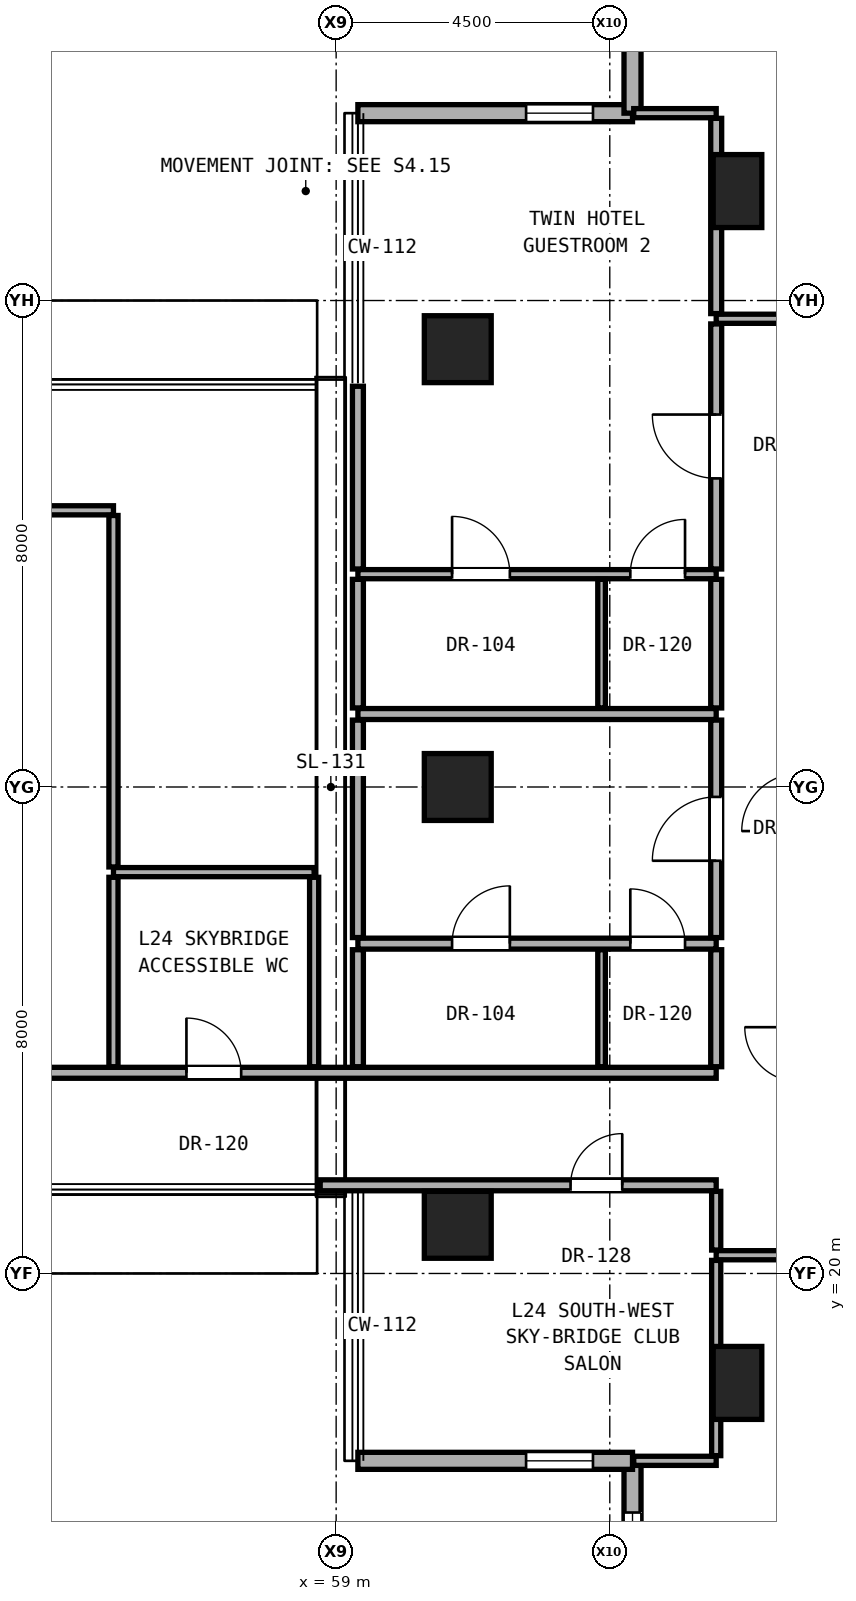
"""IFC4 building model, lengths in metres.
Left out: names, types, materials, properties, quantities, classifications, styles, units other than length and angle.
Written with IfcOpenShell. Run it as: python <this file> out.ifc"""

import sys

from ifc_helpers import new_model, si_unit, direction, frame, frame_2d, origin, origin_2d, place, context, subcontext, project, spatial, rectangle, hollow_rectangle, extrude, element, fill, save


model = new_model("IFC4")
c1 = context("Model", 3, precision=1e-05, world=origin(), true_north=direction((0.0, 1.0)))
c2 = subcontext(c1, "Body", "Model", "MODEL_VIEW")
j1 = project(units=[si_unit("LENGTHUNIT", "METRE"), si_unit("PLANEANGLEUNIT", "RADIAN")], contexts=[c1])
p1 = place(None, origin())
s1 = spatial("IfcSite", under=j1, at=p1, CompositionType="ELEMENT")
p2 = place(p1, origin())
s2 = spatial("IfcBuilding", under=s1, at=p2, CompositionType="ELEMENT")
p3 = place(p2, frame((0.0, 0.0, 88.4)))
s3 = spatial("IfcBuildingStorey", under=s2, at=p3, CompositionType="ELEMENT", Elevation=88.4)
for number, where, z_axis, x_axis in (
    (1, (61.0, 20.8, 0.0), (0.0, 0.0, 1.0), (1.0, 0.0, 0.0)),
    (2, (61.0, 28.0, 0.0), (0.0, 0.0, 1.0), (1.0, 0.0, 0.0)),
    (3, (61.0, 35.2, 0.0), (0.0, 0.0, 1.0), (1.0, 0.0, 0.0)),
):
    element("IfcColumn", number, at=place(p3, frame(where, z_axis=z_axis, x_axis=x_axis)), inside=s3, PredefinedType="COLUMN", context=c2, shape_type="SweptSolid", body=[
        extrude(hollow_rectangle(XDim=1.1, YDim=1.1, WallThickness=0.06, at=origin_2d()), origin(), (0.0, 0.0, 1.0), 3.3),
    ])
for number, where, z_axis, x_axis in (
    (4, (65.6, 18.2, 0.0), (0.0, 0.0, 1.0), (1.0, 0.0, 0.0)),
    (5, (65.6, 37.8, 0.0), (0.0, 0.0, 1.0), (1.0, 0.0, 0.0)),
):
    element("IfcColumn", number, at=place(p3, frame(where, z_axis=z_axis, x_axis=x_axis)), inside=s3, PredefinedType="PILASTER", context=c2, shape_type="SweptSolid", body=[
        extrude(rectangle(XDim=0.8, YDim=1.2, at=origin_2d()), origin(), (0.0, 0.0, 1.0), 3.3),
    ])
p4 = place(p3, frame((63.874, 16.919, 0.0), z_axis=(0.0, 0.0, 1.0), x_axis=(0.0, -1.0, 0.0)))
e6 = element("IfcWall", 6, at=p4, inside=s3, PredefinedType="SOLIDWALL", context=c2, shape_type="SweptSolid", body=[
    extrude(rectangle(XDim=4.516, YDim=0.28, at=frame_2d((2.258, 0.0))), origin(), (0.0, 0.0, 1.0), 3.06),
])
p5 = place(p4, frame((0.85, 0.0, 0.81)))
e7 = element("IfcOpeningElement", 7, at=p5, cuts=e6, PredefinedType="OPENING", context=c2, shape_type="SweptSolid", body=[
    extrude(rectangle(XDim=1.8, YDim=2.1, at=frame_2d((0.9, 1.05))), frame((0.0, 0.15, 0.0), z_axis=(0.0, -1.0, 0.0), x_axis=(1.0, 0.0, 0.0)), (0.0, 0.0, 1.0), 0.3),
])
p6 = place(p3, frame((59.357, 16.919, 0.0), z_axis=(0.0, 0.0, 1.0), x_axis=(1.0, 0.0, 0.0)))
e8 = element("IfcWall", 8, at=p6, inside=s3, PredefinedType="SOLIDWALL", context=c2, shape_type="SweptSolid", body=[
    extrude(rectangle(XDim=4.516, YDim=0.28, at=frame_2d((2.258, 0.0))), origin(), (0.0, 0.0, 1.0), 3.06),
])
p7 = place(p6, frame((2.766, 0.0, 0.85)))
e9 = element("IfcOpeningElement", 9, at=p7, cuts=e8, PredefinedType="OPENING", context=c2, shape_type="SweptSolid", body=[
    extrude(rectangle(XDim=1.1, YDim=2.0, at=frame_2d((0.55, 1.0))), frame((0.0, 0.15, 0.0), z_axis=(0.0, -1.0, 0.0), x_axis=(1.0, 0.0, 0.0)), (0.0, 0.0, 1.0), 0.3),
])
p8 = place(p3, frame((63.874, 39.081, 0.0), z_axis=(0.0, 0.0, 1.0), x_axis=(-1.0, 0.0, 0.0)))
e10 = element("IfcWall", 10, at=p8, inside=s3, PredefinedType="SOLIDWALL", context=c2, shape_type="SweptSolid", body=[
    extrude(rectangle(XDim=4.516, YDim=0.28, at=frame_2d((2.258, 0.0))), origin(), (0.0, 0.0, 1.0), 3.06),
])
p9 = place(p8, frame((0.65, 0.0, 0.85)))
e11 = element("IfcOpeningElement", 11, at=p9, cuts=e10, PredefinedType="OPENING", context=c2, shape_type="SweptSolid", body=[
    extrude(rectangle(XDim=1.1, YDim=2.0, at=frame_2d((0.55, 1.0))), frame((0.0, 0.15, 0.0), z_axis=(0.0, -1.0, 0.0), x_axis=(1.0, 0.0, 0.0)), (0.0, 0.0, 1.0), 0.3),
])
p10 = place(p3, frame((63.874, 43.597, 0.0), z_axis=(0.0, 0.0, 1.0), x_axis=(0.0, -1.0, 0.0)))
e12 = element("IfcWall", 12, at=p10, inside=s3, PredefinedType="SOLIDWALL", context=c2, shape_type="SweptSolid", body=[
    extrude(rectangle(XDim=4.516, YDim=0.28, at=frame_2d((2.258, 0.0))), origin(), (0.0, 0.0, 1.0), 3.06),
])
p11 = place(p3, frame((63.894, 16.919, 0.0), z_axis=(0.0, 0.0, 1.0), x_axis=(1.0, 0.0, 0.0)))
e13 = element("IfcWall", 13, at=p11, inside=s3, PredefinedType="PARTITIONING", context=c2, shape_type="SweptSolid", body=[
    extrude(rectangle(XDim=1.356, YDim=0.15, at=frame_2d((0.678, 0.0))), origin(), (0.0, 0.0, 1.0), 3.08),
])
p12 = place(p3, frame((65.25, 20.3, 0.0), z_axis=(0.0, 0.0, 1.0), x_axis=(1.0, 0.0, 0.0)))
e14 = element("IfcWall", 14, at=p12, inside=s3, PredefinedType="PARTITIONING", context=c2, shape_type="SweptSolid", body=[
    extrude(rectangle(XDim=1.37, YDim=0.15, at=frame_2d((0.685, 0.0))), origin(), (0.0, 0.0, 1.0), 3.08),
])
p13 = place(p3, frame((58.738, 21.45, 0.0), z_axis=(0.0, 0.0, 1.0), x_axis=(1.0, 0.0, 0.0)))
e15 = element("IfcWall", 15, at=p13, inside=s3, PredefinedType="PARTITIONING", context=c2, shape_type="SweptSolid", body=[
    extrude(rectangle(XDim=6.512, YDim=0.18, at=frame_2d((3.256, 0.0))), origin(), (0.0, 0.0, 1.0), 2.085),
])
p14 = place(p13, frame((4.117, 0.0, 0.0)))
e16 = element("IfcOpeningElement", 16, at=p14, cuts=e15, PredefinedType="OPENING", context=c2, shape_type="SweptSolid", body=[
    extrude(rectangle(XDim=0.85, YDim=2.01, at=frame_2d((0.425, 1.005))), frame((0.0, 0.1, 0.0), z_axis=(0.0, -1.0, 0.0), x_axis=(1.0, 0.0, 0.0)), (0.0, 0.0, 1.0), 0.2),
])
p15 = place(p3, frame((32.14, 23.3, 0.0), z_axis=(0.0, 0.0, 1.0), x_axis=(1.0, 0.0, 0.0)))
e17 = element("IfcWall", 17, at=p15, inside=s3, PredefinedType="PARTITIONING", context=c2, shape_type="SweptSolid", body=[
    extrude(rectangle(XDim=33.11, YDim=0.18, at=frame_2d((16.555, 0.0))), origin(), (0.0, 0.0, 1.0), 2.145),
])
p16 = place(p15, frame((12.335, 0.0, 0.0)))
e18 = element("IfcOpeningElement", 18, at=p16, cuts=e17, PredefinedType="OPENING", context=c2, shape_type="SweptSolid", body=[
    extrude(rectangle(XDim=0.85, YDim=2.01, at=frame_2d((0.425, 1.005))), frame((0.0, 0.1, 0.0), z_axis=(0.0, -1.0, 0.0), x_axis=(1.0, 0.0, 0.0)), (0.0, 0.0, 1.0), 0.2),
])
p17 = place(p15, frame((19.504, 0.0, 0.0)))
e19 = element("IfcOpeningElement", 19, at=p17, cuts=e17, PredefinedType="OPENING", context=c2, shape_type="SweptSolid", body=[
    extrude(rectangle(XDim=0.85, YDim=2.01, at=frame_2d((0.425, 1.005))), frame((0.0, 0.1, 0.0), z_axis=(0.0, -1.0, 0.0), x_axis=(1.0, 0.0, 0.0)), (0.0, 0.0, 1.0), 0.2),
])
p18 = place(p15, frame((24.398, 0.0, 0.0)))
e20 = element("IfcOpeningElement", 20, at=p18, cuts=e17, PredefinedType="OPENING", context=c2, shape_type="SweptSolid", body=[
    extrude(rectangle(XDim=0.9, YDim=2.1, at=frame_2d((0.45, 1.05))), frame((0.0, 0.1, 0.0), z_axis=(0.0, -1.0, 0.0), x_axis=(1.0, 0.0, 0.0)), (0.0, 0.0, 1.0), 0.2),
])
p19 = place(p3, frame((59.358, 25.424, 0.0), z_axis=(0.0, 0.0, 1.0), x_axis=(1.0, 0.0, 0.0)))
e21 = element("IfcWall", 21, at=p19, inside=s3, PredefinedType="PARTITIONING", context=c2, shape_type="SweptSolid", body=[
    extrude(rectangle(XDim=5.892, YDim=0.18, at=frame_2d((2.946, 0.0))), origin(), (0.0, 0.0, 1.0), 2.216),
])
p20 = place(p19, frame((1.549, 0.0, 0.0)))
e22 = element("IfcOpeningElement", 22, at=p20, cuts=e21, PredefinedType="OPENING", context=c2, shape_type="SweptSolid", body=[
    extrude(rectangle(XDim=0.95, YDim=2.15, at=frame_2d((0.475, 1.075))), frame((0.0, 0.1, 0.0), z_axis=(0.0, -1.0, 0.0), x_axis=(1.0, 0.0, 0.0)), (0.0, 0.0, 1.0), 0.2),
])
p21 = place(p19, frame((4.479, 0.0, 0.0)))
e23 = element("IfcOpeningElement", 23, at=p21, cuts=e21, PredefinedType="OPENING", context=c2, shape_type="SweptSolid", body=[
    extrude(rectangle(XDim=0.9, YDim=2.1, at=frame_2d((0.45, 1.05))), frame((0.0, 0.1, 0.0), z_axis=(0.0, -1.0, 0.0), x_axis=(1.0, 0.0, 0.0)), (0.0, 0.0, 1.0), 0.2),
])
p22 = place(p3, frame((55.338, 26.6, 0.0), z_axis=(0.0, 0.0, 1.0), x_axis=(1.0, 0.0, 0.0)))
e24 = element("IfcWall", 24, at=p22, inside=s3, PredefinedType="PARTITIONING", context=c2, shape_type="SweptSolid", body=[
    extrude(rectangle(XDim=3.3, YDim=0.15, at=frame_2d((1.65, 0.0))), origin(), (0.0, 0.0, 1.0), 2.085),
])
p23 = place(p3, frame((59.358, 29.2, 0.0), z_axis=(0.0, 0.0, 1.0), x_axis=(1.0, 0.0, 0.0)))
e25 = element("IfcWall", 25, at=p23, inside=s3, PredefinedType="PARTITIONING", context=c2, shape_type="SweptSolid", body=[
    extrude(rectangle(XDim=5.892, YDim=0.18, at=frame_2d((2.946, 0.0))), origin(), (0.0, 0.0, 1.0), 2.216),
])
p24 = place(p3, frame((59.358, 31.5, 0.0), z_axis=(0.0, 0.0, 1.0), x_axis=(1.0, 0.0, 0.0)))
e26 = element("IfcWall", 26, at=p24, inside=s3, PredefinedType="PARTITIONING", context=c2, shape_type="SweptSolid", body=[
    extrude(rectangle(XDim=5.892, YDim=0.15, at=frame_2d((2.946, 0.0))), origin(), (0.0, 0.0, 1.0), 2.216),
])
p25 = place(p24, frame((1.549, 0.0, 0.0)))
e27 = element("IfcOpeningElement", 27, at=p25, cuts=e26, PredefinedType="OPENING", context=c2, shape_type="SweptSolid", body=[
    extrude(rectangle(XDim=0.95, YDim=2.15, at=frame_2d((0.475, 1.075))), frame((0.0, 0.085, 0.0), z_axis=(0.0, -1.0, 0.0), x_axis=(1.0, 0.0, 0.0)), (0.0, 0.0, 1.0), 0.17),
])
p26 = place(p24, frame((4.479, 0.0, 0.0)))
e28 = element("IfcOpeningElement", 28, at=p26, cuts=e26, PredefinedType="OPENING", context=c2, shape_type="SweptSolid", body=[
    extrude(rectangle(XDim=0.9, YDim=2.1, at=frame_2d((0.45, 1.05))), frame((0.0, 0.085, 0.0), z_axis=(0.0, -1.0, 0.0), x_axis=(1.0, 0.0, 0.0)), (0.0, 0.0, 1.0), 0.17),
])
p27 = place(p3, frame((41.0, 32.55, 0.0), z_axis=(0.0, 0.0, 1.0), x_axis=(1.0, 0.0, 0.0)))
e29 = element("IfcWall", 29, at=p27, inside=s3, PredefinedType="PARTITIONING", context=c2, shape_type="SweptSolid", body=[
    extrude(rectangle(XDim=14.338, YDim=0.15, at=frame_2d((7.169, 0.0))), origin(), (0.0, 0.0, 1.0), 2.316),
])
p28 = place(p3, frame((65.25, 35.7, 0.0), z_axis=(0.0, 0.0, 1.0), x_axis=(1.0, 0.0, 0.0)))
e30 = element("IfcWall", 30, at=p28, inside=s3, PredefinedType="PARTITIONING", context=c2, shape_type="SweptSolid", body=[
    extrude(rectangle(XDim=1.37, YDim=0.15, at=frame_2d((0.685, 0.0))), origin(), (0.0, 0.0, 1.0), 3.08),
])
p29 = place(p3, frame((63.894, 39.081, 0.0), z_axis=(0.0, 0.0, 1.0), x_axis=(1.0, 0.0, 0.0)))
e31 = element("IfcWall", 31, at=p29, inside=s3, PredefinedType="PARTITIONING", context=c2, shape_type="SweptSolid", body=[
    extrude(rectangle(XDim=1.356, YDim=0.15, at=frame_2d((0.678, 0.0))), origin(), (0.0, 0.0, 1.0), 3.08),
])
p30 = place(p3, frame((55.338, 23.4, 0.0), z_axis=(0.0, 0.0, 1.0), x_axis=(0.0, 1.0, 0.0)))
e32 = element("IfcWall", 32, at=p30, inside=s3, PredefinedType="PARTITIONING", context=c2, shape_type="SweptSolid", body=[
    extrude(rectangle(XDim=3.115, YDim=0.15, at=frame_2d((1.558, 0.0))), origin(), (0.0, 0.0, 1.0), 3.02),
])
p31 = place(p3, frame((55.338, 26.685, 0.0), z_axis=(0.0, 0.0, 1.0), x_axis=(0.0, 1.0, 0.0)))
e33 = element("IfcWall", 33, at=p31, inside=s3, PredefinedType="PARTITIONING", context=c2, shape_type="SweptSolid", body=[
    extrude(rectangle(XDim=5.78, YDim=0.15, at=frame_2d((2.89, 0.0))), origin(), (0.0, 0.0, 1.0), 2.085),
])
p32 = place(p3, frame((58.638, 23.4, 0.0), z_axis=(0.0, 0.0, 1.0), x_axis=(0.0, 1.0, 0.0)))
e34 = element("IfcWall", 34, at=p32, inside=s3, PredefinedType="PARTITIONING", context=c2, shape_type="SweptSolid", body=[
    extrude(rectangle(XDim=3.115, YDim=0.15, at=frame_2d((1.558, 0.0))), origin(), (0.0, 0.0, 1.0), 3.02),
])
p33 = place(p3, frame((59.358, 23.4, 0.0), z_axis=(0.0, 0.0, 1.0), x_axis=(0.0, 1.0, 0.0)))
e35 = element("IfcWall", 35, at=p33, inside=s3, PredefinedType="PARTITIONING", context=c2, shape_type="SweptSolid", body=[
    extrude(rectangle(XDim=1.924, YDim=0.18, at=frame_2d((0.962, 0.0))), origin(), (0.0, 0.0, 1.0), 3.08),
])
p34 = place(p3, frame((59.358, 25.524, 0.0), z_axis=(0.0, 0.0, 1.0), x_axis=(0.0, 1.0, 0.0)))
e36 = element("IfcWall", 36, at=p34, inside=s3, PredefinedType="PARTITIONING", context=c2, shape_type="SweptSolid", body=[
    extrude(rectangle(XDim=3.576, YDim=0.18, at=frame_2d((1.788, 0.0))), origin(), (0.0, 0.0, 1.0), 2.085),
])
p35 = place(p3, frame((59.358, 29.3, 0.0), z_axis=(0.0, 0.0, 1.0), x_axis=(0.0, 1.0, 0.0)))
e37 = element("IfcWall", 37, at=p35, inside=s3, PredefinedType="PARTITIONING", context=c2, shape_type="SweptSolid", body=[
    extrude(rectangle(XDim=2.115, YDim=0.18, at=frame_2d((1.058, 0.0))), origin(), (0.0, 0.0, 1.0), 3.08),
])
p36 = place(p3, frame((59.358, 31.585, 0.0), z_axis=(0.0, 0.0, 1.0), x_axis=(0.0, 1.0, 0.0)))
e38 = element("IfcWall", 38, at=p36, inside=s3, PredefinedType="PARTITIONING", context=c2, shape_type="SweptSolid", body=[
    extrude(rectangle(XDim=3.005, YDim=0.18, at=frame_2d((1.502, 0.0))), origin(), (0.0, 0.0, 1.0), 2.085),
])
p37 = place(p3, frame((63.365, 23.4, 0.0), z_axis=(0.0, 0.0, 1.0), x_axis=(0.0, 1.0, 0.0)))
e39 = element("IfcWall", 39, at=p37, inside=s3, PredefinedType="PARTITIONING", context=c2, shape_type="SweptSolid", body=[
    extrude(rectangle(XDim=1.924, YDim=0.125, at=frame_2d((0.962, 0.0))), origin(), (0.0, 0.0, 1.0), 3.08),
])
p38 = place(p3, frame((63.365, 29.3, 0.0), z_axis=(0.0, 0.0, 1.0), x_axis=(0.0, 1.0, 0.0)))
e40 = element("IfcWall", 40, at=p38, inside=s3, PredefinedType="PARTITIONING", context=c2, shape_type="SweptSolid", body=[
    extrude(rectangle(XDim=2.115, YDim=0.125, at=frame_2d((1.058, 0.0))), origin(), (0.0, 0.0, 1.0), 3.08),
])
p39 = place(p3, frame((65.25, 17.004, 0.0), z_axis=(0.0, 0.0, 1.0), x_axis=(0.0, 1.0, 0.0)))
e41 = element("IfcWall", 41, at=p39, inside=s3, PredefinedType="PARTITIONING", context=c2, shape_type="SweptSolid", body=[
    extrude(rectangle(XDim=3.211, YDim=0.15, at=frame_2d((1.605, 0.0))), origin(), (0.0, 0.0, 1.0), 2.456),
])
p40 = place(p3, frame((65.25, 20.385, 0.0), z_axis=(0.0, 0.0, 1.0), x_axis=(0.0, 1.0, 0.0)))
e42 = element("IfcWall", 42, at=p40, inside=s3, PredefinedType="PARTITIONING", context=c2, shape_type="SweptSolid", body=[
    extrude(rectangle(XDim=0.965, YDim=0.15, at=frame_2d((0.482, 0.0))), origin(), (0.0, 0.0, 1.0), 2.472),
])
p41 = place(p3, frame((65.25, 23.4, 0.0), z_axis=(0.0, 0.0, 1.0), x_axis=(0.0, 1.0, 0.0)))
e43 = element("IfcWall", 43, at=p41, inside=s3, PredefinedType="PARTITIONING", context=c2, shape_type="SweptSolid", body=[
    extrude(rectangle(XDim=1.924, YDim=0.18, at=frame_2d((0.962, 0.0))), origin(), (0.0, 0.0, 1.0), 3.08),
])
p42 = place(p3, frame((65.25, 25.524, 0.0), z_axis=(0.0, 0.0, 1.0), x_axis=(0.0, 1.0, 0.0)))
e44 = element("IfcWall", 44, at=p42, inside=s3, PredefinedType="PARTITIONING", context=c2, shape_type="SweptSolid", body=[
    extrude(rectangle(XDim=3.576, YDim=0.18, at=frame_2d((1.788, 0.0))), origin(), (0.0, 0.0, 1.0), 2.299),
])
p43 = place(p42, frame((1.263, 0.0, 0.0)))
e45 = element("IfcOpeningElement", 45, at=p43, cuts=e44, PredefinedType="OPENING", context=c2, shape_type="SweptSolid", body=[
    extrude(rectangle(XDim=1.05, YDim=2.2, at=frame_2d((0.525, 1.1))), frame((0.0, 0.1, 0.0), z_axis=(0.0, -1.0, 0.0), x_axis=(1.0, 0.0, 0.0)), (0.0, 0.0, 1.0), 0.2),
])
p44 = place(p3, frame((65.25, 29.3, 0.0), z_axis=(0.0, 0.0, 1.0), x_axis=(0.0, 1.0, 0.0)))
e46 = element("IfcWall", 46, at=p44, inside=s3, PredefinedType="PARTITIONING", context=c2, shape_type="SweptSolid", body=[
    extrude(rectangle(XDim=2.115, YDim=0.18, at=frame_2d((1.058, 0.0))), origin(), (0.0, 0.0, 1.0), 3.08),
])
p45 = place(p3, frame((65.25, 31.585, 0.0), z_axis=(0.0, 0.0, 1.0), x_axis=(0.0, 1.0, 0.0)))
e47 = element("IfcWall", 47, at=p45, inside=s3, PredefinedType="PARTITIONING", context=c2, shape_type="SweptSolid", body=[
    extrude(rectangle(XDim=4.03, YDim=0.18, at=frame_2d((2.015, 0.0))), origin(), (0.0, 0.0, 1.0), 2.472),
])
p46 = place(p45, frame((1.49, 0.0, 0.0)))
e48 = element("IfcOpeningElement", 48, at=p46, cuts=e47, PredefinedType="OPENING", context=c2, shape_type="SweptSolid", body=[
    extrude(rectangle(XDim=1.05, YDim=2.2, at=frame_2d((0.525, 1.1))), frame((0.0, 0.1, 0.0), z_axis=(0.0, -1.0, 0.0), x_axis=(1.0, 0.0, 0.0)), (0.0, 0.0, 1.0), 0.2),
])
p47 = place(p3, frame((65.25, 35.785, 0.0), z_axis=(0.0, 0.0, 1.0), x_axis=(0.0, 1.0, 0.0)))
e49 = element("IfcWall", 49, at=p47, inside=s3, PredefinedType="PARTITIONING", context=c2, shape_type="SweptSolid", body=[
    extrude(rectangle(XDim=3.211, YDim=0.18, at=frame_2d((1.605, 0.0))), origin(), (0.0, 0.0, 1.0), 2.456),
])
p48 = place(p5, origin())
e50 = element("IfcWindow", 50, at=p48, inside=s3, PartitioningType="SINGLE_PANEL", PredefinedType="WINDOW", context=c2, shape_type="SweptSolid", body=[
    extrude(rectangle(XDim=1.8, YDim=2.1, at=frame_2d((0.9, 1.05))), frame((0.0, 0.03, 0.0), z_axis=(0.0, -1.0, 0.0), x_axis=(1.0, 0.0, 0.0)), (0.0, 0.0, 1.0), 0.06),
])
fill(e7, e50)
p49 = place(p7, origin())
e51 = element("IfcWindow", 51, at=p49, inside=s3, PartitioningType="SINGLE_PANEL", PredefinedType="WINDOW", context=c2, shape_type="SweptSolid", body=[
    extrude(rectangle(XDim=1.1, YDim=2.0, at=frame_2d((0.55, 1.0))), frame((0.0, 0.03, 0.0), z_axis=(0.0, -1.0, 0.0), x_axis=(1.0, 0.0, 0.0)), (0.0, 0.0, 1.0), 0.06),
])
fill(e9, e51)
p50 = place(p9, origin())
e52 = element("IfcWindow", 52, at=p50, inside=s3, PartitioningType="SINGLE_PANEL", PredefinedType="WINDOW", context=c2, shape_type="SweptSolid", body=[
    extrude(rectangle(XDim=1.1, YDim=2.0, at=frame_2d((0.55, 1.0))), frame((0.0, 0.03, 0.0), z_axis=(0.0, -1.0, 0.0), x_axis=(1.0, 0.0, 0.0)), (0.0, 0.0, 1.0), 0.06),
])
fill(e11, e52)
p51 = place(p43, origin())
e53 = element("IfcDoor", 53, at=p51, inside=s3, OperationType="SINGLE_SWING_LEFT", PredefinedType="DOOR", context=c2, shape_type="SweptSolid", body=[
    extrude(rectangle(XDim=1.05, YDim=2.2, at=frame_2d((0.525, 1.1))), frame((0.0, 0.025, 0.0), z_axis=(0.0, -1.0, 0.0), x_axis=(1.0, 0.0, 0.0)), (0.0, 0.0, 1.0), 0.05),
])
fill(e45, e53)
p52 = place(p20, origin())
e54 = element("IfcDoor", 54, at=p52, inside=s3, OperationType="SINGLE_SWING_RIGHT", PredefinedType="DOOR", context=c2, shape_type="SweptSolid", body=[
    extrude(rectangle(XDim=0.95, YDim=2.15, at=frame_2d((0.475, 1.075))), frame((0.0, 0.025, 0.0), z_axis=(0.0, -1.0, 0.0), x_axis=(1.0, 0.0, 0.0)), (0.0, 0.0, 1.0), 0.05),
])
fill(e22, e54)
p53 = place(p21, origin())
e55 = element("IfcDoor", 55, at=p53, inside=s3, OperationType="SINGLE_SWING_LEFT", PredefinedType="DOOR", context=c2, shape_type="SweptSolid", body=[
    extrude(rectangle(XDim=0.9, YDim=2.1, at=frame_2d((0.45, 1.05))), frame((0.0, 0.025, 0.0), z_axis=(0.0, -1.0, 0.0), x_axis=(1.0, 0.0, 0.0)), (0.0, 0.0, 1.0), 0.05),
])
fill(e23, e55)
p54 = place(p46, origin())
e56 = element("IfcDoor", 56, at=p54, inside=s3, OperationType="SINGLE_SWING_RIGHT", PredefinedType="DOOR", context=c2, shape_type="SweptSolid", body=[
    extrude(rectangle(XDim=1.05, YDim=2.2, at=frame_2d((0.525, 1.1))), frame((0.0, 0.025, 0.0), z_axis=(0.0, -1.0, 0.0), x_axis=(1.0, 0.0, 0.0)), (0.0, 0.0, 1.0), 0.05),
])
fill(e48, e56)
p55 = place(p25, origin())
e57 = element("IfcDoor", 57, at=p55, inside=s3, OperationType="SINGLE_SWING_LEFT", PredefinedType="DOOR", context=c2, shape_type="SweptSolid", body=[
    extrude(rectangle(XDim=0.95, YDim=2.15, at=frame_2d((0.475, 1.075))), frame((0.0, 0.025, 0.0), z_axis=(0.0, -1.0, 0.0), x_axis=(1.0, 0.0, 0.0)), (0.0, 0.0, 1.0), 0.05),
])
fill(e27, e57)
p56 = place(p26, origin())
e58 = element("IfcDoor", 58, at=p56, inside=s3, OperationType="SINGLE_SWING_RIGHT", PredefinedType="DOOR", context=c2, shape_type="SweptSolid", body=[
    extrude(rectangle(XDim=0.9, YDim=2.1, at=frame_2d((0.45, 1.05))), frame((0.0, 0.025, 0.0), z_axis=(0.0, -1.0, 0.0), x_axis=(1.0, 0.0, 0.0)), (0.0, 0.0, 1.0), 0.05),
])
fill(e28, e58)
p57 = place(p14, origin())
e59 = element("IfcDoor", 59, at=p57, inside=s3, OperationType="SINGLE_SWING_RIGHT", PredefinedType="DOOR", context=c2, shape_type="SweptSolid", body=[
    extrude(rectangle(XDim=0.85, YDim=2.01, at=frame_2d((0.425, 1.005))), frame((0.0, 0.025, 0.0), z_axis=(0.0, -1.0, 0.0), x_axis=(1.0, 0.0, 0.0)), (0.0, 0.0, 1.0), 0.05),
])
fill(e16, e59)
p58 = place(p18, origin())
e60 = element("IfcDoor", 60, at=p58, inside=s3, OperationType="SINGLE_SWING_LEFT", PredefinedType="DOOR", context=c2, shape_type="SweptSolid", body=[
    extrude(rectangle(XDim=0.9, YDim=2.1, at=frame_2d((0.45, 1.05))), frame((0.0, 0.025, 0.0), z_axis=(0.0, -1.0, 0.0), x_axis=(1.0, 0.0, 0.0)), (0.0, 0.0, 1.0), 0.05),
])
fill(e20, e60)
save(model, sys.argv[1])
